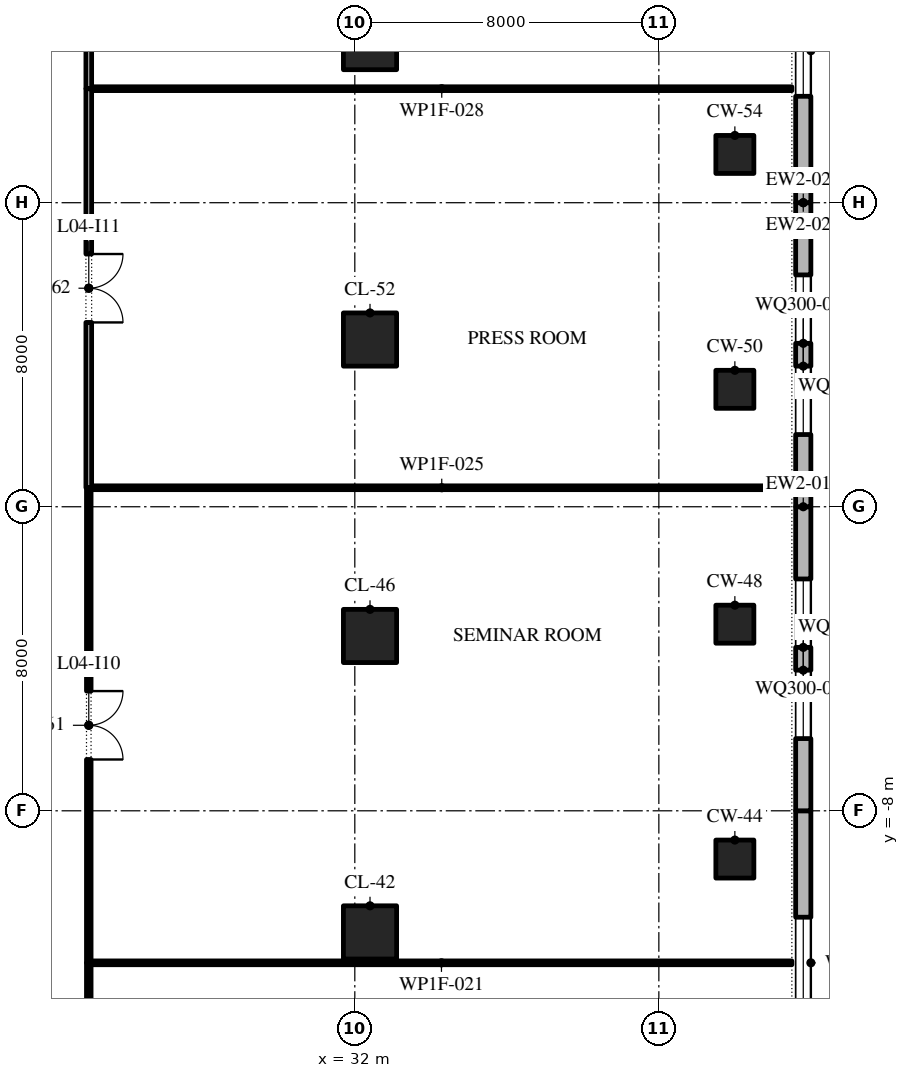
"""IFC4 building model, lengths in metres.
Left out: names, types, materials, properties, quantities, classifications, styles, units other than length and angle.
Written with IfcOpenShell. Run it as: python <this file> out.ifc"""

import sys

from ifc_helpers import new_model, si_unit, direction, frame, frame_2d, origin, origin_2d, place, context, subcontext, project, spatial, polyline, rectangle, outline, extrude, element, fill, save


model = new_model("IFC4")
c1 = context("Model", 3, precision=1e-05, world=origin(), true_north=direction((0.0, 1.0)))
c2 = subcontext(c1, "Body", "Model", "MODEL_VIEW")
j1 = project(units=[si_unit("LENGTHUNIT", "METRE"), si_unit("PLANEANGLEUNIT", "RADIAN")], contexts=[c1])
p1 = place(None, origin())
s1 = spatial("IfcSite", under=j1, at=p1, CompositionType="ELEMENT")
p2 = place(p1, origin())
s2 = spatial("IfcBuilding", under=s1, at=p2, CompositionType="ELEMENT")
p3 = place(p2, frame((0.0, 0.0, 24.0)))
s3 = spatial("IfcBuildingStorey", under=s2, at=p3, CompositionType="ELEMENT", Elevation=24.0)
p4 = place(p3, frame((32.4, -11.2, 0.0), z_axis=(0.0, 0.0, 1.0), x_axis=(1.0, 0.0, 0.0)))
e1 = element("IfcColumn", 1, at=p4, inside=s3, PredefinedType="COLUMN", context=c2, shape_type="SweptSolid", body=[
    extrude(rectangle(XDim=1.4, YDim=1.4, at=origin_2d()), origin(), (0.0, 0.0, 1.0), 4.8),
])
p5 = place(p3, frame((42.0, -9.27, 0.0), z_axis=(0.0, 0.0, 1.0), x_axis=(1.0, 0.0, 0.0)))
e2 = element("IfcColumn", 2, at=p5, inside=s3, PredefinedType="COLUMN", context=c2, shape_type="SweptSolid", body=[
    extrude(rectangle(XDim=1.0, YDim=1.0, at=origin_2d()), origin(), (0.0, 0.0, 1.0), 4.8),
])
p6 = place(p3, frame((32.4, -3.4, 0.0), z_axis=(0.0, 0.0, 1.0), x_axis=(1.0, 0.0, 0.0)))
e3 = element("IfcColumn", 3, at=p6, inside=s3, PredefinedType="COLUMN", context=c2, shape_type="SweptSolid", body=[
    extrude(rectangle(XDim=1.4, YDim=1.4, at=origin_2d()), origin(), (0.0, 0.0, 1.0), 4.8),
])
for number, where, z_axis, x_axis in (
    (4, (42.0, -3.09, 0.0), (0.0, 0.0, 1.0), (1.0, 0.0, 0.0)),
    (5, (42.0, 3.09, 0.0), (0.0, 0.0, 1.0), (1.0, 0.0, 0.0)),
):
    element("IfcColumn", number, at=place(p3, frame(where, z_axis=z_axis, x_axis=x_axis)), inside=s3, PredefinedType="COLUMN", context=c2, shape_type="SweptSolid", body=[
        extrude(rectangle(XDim=1.0, YDim=1.0, at=origin_2d()), origin(), (0.0, 0.0, 1.0), 4.8),
    ])
p7 = place(p3, frame((32.4, 4.4, 0.0), z_axis=(0.0, 0.0, 1.0), x_axis=(1.0, 0.0, 0.0)))
e6 = element("IfcColumn", 6, at=p7, inside=s3, PredefinedType="COLUMN", context=c2, shape_type="SweptSolid", body=[
    extrude(rectangle(XDim=1.4, YDim=1.4, at=origin_2d()), origin(), (0.0, 0.0, 1.0), 4.8),
])
p8 = place(p3, frame((42.0, 9.27, 0.0), z_axis=(0.0, 0.0, 1.0), x_axis=(1.0, 0.0, 0.0)))
e7 = element("IfcColumn", 7, at=p8, inside=s3, PredefinedType="COLUMN", context=c2, shape_type="SweptSolid", body=[
    extrude(rectangle(XDim=1.0, YDim=1.0, at=origin_2d()), origin(), (0.0, 0.0, 1.0), 4.8),
])
p9 = place(p3, frame((32.4, 12.2, 0.0), z_axis=(0.0, 0.0, 1.0), x_axis=(1.0, 0.0, 0.0)))
e8 = element("IfcColumn", 8, at=p9, inside=s3, PredefinedType="COLUMN", context=c2, shape_type="SweptSolid", body=[
    extrude(rectangle(XDim=1.4, YDim=1.4, at=origin_2d()), origin(), (0.0, 0.0, 1.0), 4.8),
])
p10 = place(p3, frame((43.8, -16.0, 0.0), z_axis=(0.0, 0.0, 1.0), x_axis=(0.0, 1.0, 0.0)))
e9 = element("IfcWall", 9, at=p10, inside=s3, PredefinedType="STANDARD", context=c2, shape_type="SweptSolid", body=[
    extrude(rectangle(XDim=8.0, YDim=0.4, at=frame_2d((4.0, 0.0))), origin(), (0.0, 0.0, 1.0), 4.5),
])
p11 = place(p10, frame((2.8, 0.0, 0.9)))
e10 = element("IfcOpeningElement", 10, at=p11, cuts=e9, PredefinedType="OPENING", context=c2, shape_type="SweptSolid", body=[
    extrude(outline(polyline([(0.0, 0.0), (2.4, 0.0), (2.4, 1.5), (2.378, 1.758), (2.313, 2.009), (2.207, 2.245), (2.063, 2.46), (1.885, 2.648), (1.677, 2.804), (1.447, 2.922), (1.2, 3.0), (0.953, 2.922), (0.722, 2.804), (0.515, 2.648), (0.337, 2.46), (0.193, 2.245), (0.087, 2.009), (0.022, 1.758), (0.0, 1.5), (0.0, 0.0)])), frame((0.0, 0.21, 0.0), z_axis=(0.0, -1.0, 0.0), x_axis=(1.0, 0.0, 0.0)), (0.0, 0.0, 1.0), 0.42),
])
p12 = place(p3, frame((43.8, -8.0, 0.0), z_axis=(0.0, 0.0, 1.0), x_axis=(0.0, 1.0, 0.0)))
e11 = element("IfcWall", 11, at=p12, inside=s3, PredefinedType="STANDARD", context=c2, shape_type="SweptSolid", body=[
    extrude(rectangle(XDim=8.0, YDim=0.4, at=frame_2d((4.0, 0.0))), origin(), (0.0, 0.0, 1.0), 4.5),
])
p13 = place(p12, frame((1.9, 0.0, 0.9)))
e12 = element("IfcOpeningElement", 12, at=p13, cuts=e11, PredefinedType="OPENING", context=c2, shape_type="SweptSolid", body=[
    extrude(outline(polyline([(0.0, 0.0), (1.8, 0.0), (1.8, 1.5), (1.785, 1.729), (1.738, 1.954), (1.662, 2.17), (1.558, 2.375), (1.427, 2.563), (1.271, 2.732), (1.095, 2.879), (0.9, 3.0), (0.705, 2.879), (0.529, 2.732), (0.373, 2.563), (0.242, 2.375), (0.138, 2.17), (0.062, 1.954), (0.015, 1.729), (0.0, 1.5), (0.0, 0.0)])), frame((0.0, 0.21, 0.0), z_axis=(0.0, -1.0, 0.0), x_axis=(1.0, 0.0, 0.0)), (0.0, 0.0, 1.0), 0.42),
])
p14 = place(p12, frame((4.3, 0.0, 0.9)))
e13 = element("IfcOpeningElement", 13, at=p14, cuts=e11, PredefinedType="OPENING", context=c2, shape_type="SweptSolid", body=[
    extrude(outline(polyline([(0.0, 0.0), (1.8, 0.0), (1.8, 1.5), (1.785, 1.729), (1.738, 1.954), (1.662, 2.17), (1.558, 2.375), (1.427, 2.563), (1.271, 2.732), (1.095, 2.879), (0.9, 3.0), (0.705, 2.879), (0.529, 2.732), (0.373, 2.563), (0.242, 2.375), (0.138, 2.17), (0.062, 1.954), (0.015, 1.729), (0.0, 1.5), (0.0, 0.0)])), frame((0.0, 0.21, 0.0), z_axis=(0.0, -1.0, 0.0), x_axis=(1.0, 0.0, 0.0)), (0.0, 0.0, 1.0), 0.42),
])
p15 = place(p3, frame((43.8, 0.0, 0.0), z_axis=(0.0, 0.0, 1.0), x_axis=(0.0, 1.0, 0.0)))
e14 = element("IfcWall", 14, at=p15, inside=s3, PredefinedType="STANDARD", context=c2, shape_type="SweptSolid", body=[
    extrude(rectangle(XDim=8.0, YDim=0.4, at=frame_2d((4.0, 0.0))), origin(), (0.0, 0.0, 1.0), 4.5),
])
p16 = place(p15, frame((1.9, 0.0, 0.9)))
e15 = element("IfcOpeningElement", 15, at=p16, cuts=e14, PredefinedType="OPENING", context=c2, shape_type="SweptSolid", body=[
    extrude(outline(polyline([(0.0, 0.0), (1.8, 0.0), (1.8, 1.5), (1.785, 1.729), (1.738, 1.954), (1.662, 2.17), (1.558, 2.375), (1.427, 2.563), (1.271, 2.732), (1.095, 2.879), (0.9, 3.0), (0.705, 2.879), (0.529, 2.732), (0.373, 2.563), (0.242, 2.375), (0.138, 2.17), (0.062, 1.954), (0.015, 1.729), (0.0, 1.5), (0.0, 0.0)])), frame((0.0, 0.21, 0.0), z_axis=(0.0, -1.0, 0.0), x_axis=(1.0, 0.0, 0.0)), (0.0, 0.0, 1.0), 0.42),
])
p17 = place(p15, frame((4.3, 0.0, 0.9)))
e16 = element("IfcOpeningElement", 16, at=p17, cuts=e14, PredefinedType="OPENING", context=c2, shape_type="SweptSolid", body=[
    extrude(outline(polyline([(0.0, 0.0), (1.8, 0.0), (1.8, 1.5), (1.785, 1.729), (1.738, 1.954), (1.662, 2.17), (1.558, 2.375), (1.427, 2.563), (1.271, 2.732), (1.095, 2.879), (0.9, 3.0), (0.705, 2.879), (0.529, 2.732), (0.373, 2.563), (0.242, 2.375), (0.138, 2.17), (0.062, 1.954), (0.015, 1.729), (0.0, 1.5), (0.0, 0.0)])), frame((0.0, 0.21, 0.0), z_axis=(0.0, -1.0, 0.0), x_axis=(1.0, 0.0, 0.0)), (0.0, 0.0, 1.0), 0.42),
])
p18 = place(p3, frame((43.8, 8.0, 0.0), z_axis=(0.0, 0.0, 1.0), x_axis=(0.0, 1.0, 0.0)))
e17 = element("IfcWall", 17, at=p18, inside=s3, PredefinedType="STANDARD", context=c2, shape_type="SweptSolid", body=[
    extrude(rectangle(XDim=8.0, YDim=0.4, at=frame_2d((4.0, 0.0))), origin(), (0.0, 0.0, 1.0), 4.5),
])
p19 = place(p18, frame((2.8, 0.0, 0.9)))
e18 = element("IfcOpeningElement", 18, at=p19, cuts=e17, PredefinedType="OPENING", context=c2, shape_type="SweptSolid", body=[
    extrude(outline(polyline([(0.0, 0.0), (2.4, 0.0), (2.4, 1.5), (2.378, 1.758), (2.313, 2.009), (2.207, 2.245), (2.063, 2.46), (1.885, 2.648), (1.677, 2.804), (1.447, 2.922), (1.2, 3.0), (0.953, 2.922), (0.722, 2.804), (0.515, 2.648), (0.337, 2.46), (0.193, 2.245), (0.087, 2.009), (0.022, 1.758), (0.0, 1.5), (0.0, 0.0)])), frame((0.0, 0.21, 0.0), z_axis=(0.0, -1.0, 0.0), x_axis=(1.0, 0.0, 0.0)), (0.0, 0.0, 1.0), 0.42),
])
p20 = place(p3, frame((25.06, -12.0, 0.0), z_axis=(0.0, 0.0, 1.0), x_axis=(1.0, 0.0, 0.0)))
e19 = element("IfcWall", 19, at=p20, inside=s3, PredefinedType="PARTITIONING", context=c2, shape_type="SweptSolid", body=[
    extrude(rectangle(XDim=18.44, YDim=0.1, at=frame_2d((9.22, 0.0))), origin(), (0.0, 0.0, 1.0), 4.5),
])
for number, where, z_axis, x_axis in (
    (20, (25.075, 0.5, 0.0), (0.0, 0.0, 1.0), (1.0, 0.0, 0.0)),
    (21, (25.075, 11.0, 0.0), (0.0, 0.0, 1.0), (1.0, 0.0, 0.0)),
):
    element("IfcWall", number, at=place(p3, frame(where, z_axis=z_axis, x_axis=x_axis)), inside=s3, PredefinedType="PARTITIONING", context=c2, shape_type="SweptSolid", body=[
        extrude(rectangle(XDim=18.425, YDim=0.1, at=frame_2d((9.212, 0.0))), origin(), (0.0, 0.0, 1.0), 4.5),
    ])
p21 = place(p3, frame((25.0, -22.5, 0.0), z_axis=(0.0, 0.0, 1.0), x_axis=(0.0, 1.0, 0.0)))
e22 = element("IfcWall", 22, at=p21, inside=s3, PredefinedType="PARTITIONING", context=c2, shape_type="SweptSolid", body=[
    extrude(rectangle(XDim=10.5, YDim=0.12, at=frame_2d((5.25, 0.0))), origin(), (0.0, 0.0, 1.0), 4.5),
])
p22 = place(p21, frame((4.35, 0.0, 0.0)))
e23 = element("IfcOpeningElement", 23, at=p22, cuts=e22, PredefinedType="OPENING", context=c2, shape_type="SweptSolid", body=[
    extrude(rectangle(XDim=1.8, YDim=2.1, at=frame_2d((0.9, 1.05))), frame((0.0, 0.07, 0.0), z_axis=(0.0, -1.0, 0.0), x_axis=(1.0, 0.0, 0.0)), (0.0, 0.0, 1.0), 0.14),
])
p23 = place(p3, frame((25.0, -12.0, 0.0), z_axis=(0.0, 0.0, 1.0), x_axis=(0.0, 1.0, 0.0)))
e24 = element("IfcWall", 24, at=p23, inside=s3, PredefinedType="PARTITIONING", context=c2, shape_type="SweptSolid", body=[
    extrude(rectangle(XDim=12.5, YDim=0.12, at=frame_2d((6.25, 0.0))), origin(), (0.0, 0.0, 1.0), 4.5),
])
p24 = place(p23, frame((5.35, 0.0, 0.0)))
e25 = element("IfcOpeningElement", 25, at=p24, cuts=e24, PredefinedType="OPENING", context=c2, shape_type="SweptSolid", body=[
    extrude(rectangle(XDim=1.8, YDim=2.1, at=frame_2d((0.9, 1.05))), frame((0.0, 0.07, 0.0), z_axis=(0.0, -1.0, 0.0), x_axis=(1.0, 0.0, 0.0)), (0.0, 0.0, 1.0), 0.14),
])
p25 = place(p3, frame((25.0, 0.5, 0.0), z_axis=(0.0, 0.0, 1.0), x_axis=(0.0, 1.0, 0.0)))
e26 = element("IfcWall", 26, at=p25, inside=s3, PredefinedType="PARTITIONING", context=c2, shape_type="SweptSolid", body=[
    extrude(rectangle(XDim=10.5, YDim=0.15, at=frame_2d((5.25, 0.0))), origin(), (0.0, 0.0, 1.0), 4.5),
])
p26 = place(p25, frame((4.35, 0.0, 0.0)))
e27 = element("IfcOpeningElement", 27, at=p26, cuts=e26, PredefinedType="OPENING", context=c2, shape_type="SweptSolid", body=[
    extrude(rectangle(XDim=1.8, YDim=2.1, at=frame_2d((0.9, 1.05))), frame((0.0, 0.085, 0.0), z_axis=(0.0, -1.0, 0.0), x_axis=(1.0, 0.0, 0.0)), (0.0, 0.0, 1.0), 0.17),
])
p27 = place(p3, frame((25.0, 11.0, 0.0), z_axis=(0.0, 0.0, 1.0), x_axis=(0.0, 1.0, 0.0)))
e28 = element("IfcWall", 28, at=p27, inside=s3, PredefinedType="PARTITIONING", context=c2, shape_type="SweptSolid", body=[
    extrude(rectangle(XDim=11.0, YDim=0.15, at=frame_2d((5.5, 0.0))), origin(), (0.0, 0.0, 1.0), 4.5),
])
p28 = place(p27, frame((4.6, 0.0, 0.0)))
e29 = element("IfcOpeningElement", 29, at=p28, cuts=e28, PredefinedType="OPENING", context=c2, shape_type="SweptSolid", body=[
    extrude(rectangle(XDim=1.8, YDim=2.1, at=frame_2d((0.9, 1.05))), frame((0.0, 0.085, 0.0), z_axis=(0.0, -1.0, 0.0), x_axis=(1.0, 0.0, 0.0)), (0.0, 0.0, 1.0), 0.17),
])
p29 = place(p11, origin())
e30 = element("IfcWindow", 30, at=p29, inside=s3, PartitioningType="DOUBLE_PANEL_VERTICAL", PredefinedType="WINDOW", context=c2, shape_type="SweptSolid", body=[
    extrude(outline(polyline([(0.0, 0.0), (2.4, 0.0), (2.4, 1.5), (2.378, 1.758), (2.313, 2.009), (2.207, 2.245), (2.063, 2.46), (1.885, 2.648), (1.677, 2.804), (1.447, 2.922), (1.2, 3.0), (0.953, 2.922), (0.722, 2.804), (0.515, 2.648), (0.337, 2.46), (0.193, 2.245), (0.087, 2.009), (0.022, 1.758), (0.0, 1.5), (0.0, 0.0)])), frame((0.0, 0.03, 0.0), z_axis=(0.0, -1.0, 0.0), x_axis=(1.0, 0.0, 0.0)), (0.0, 0.0, 1.0), 0.06),
])
fill(e10, e30)
p30 = place(p13, origin())
e31 = element("IfcWindow", 31, at=p30, inside=s3, PartitioningType="DOUBLE_PANEL_VERTICAL", PredefinedType="WINDOW", context=c2, shape_type="SweptSolid", body=[
    extrude(outline(polyline([(0.0, 0.0), (1.8, 0.0), (1.8, 1.5), (1.785, 1.729), (1.738, 1.954), (1.662, 2.17), (1.558, 2.375), (1.427, 2.563), (1.271, 2.732), (1.095, 2.879), (0.9, 3.0), (0.705, 2.879), (0.529, 2.732), (0.373, 2.563), (0.242, 2.375), (0.138, 2.17), (0.062, 1.954), (0.015, 1.729), (0.0, 1.5), (0.0, 0.0)])), frame((0.0, 0.03, 0.0), z_axis=(0.0, -1.0, 0.0), x_axis=(1.0, 0.0, 0.0)), (0.0, 0.0, 1.0), 0.06),
])
fill(e12, e31)
p31 = place(p14, origin())
e32 = element("IfcWindow", 32, at=p31, inside=s3, PartitioningType="DOUBLE_PANEL_VERTICAL", PredefinedType="WINDOW", context=c2, shape_type="SweptSolid", body=[
    extrude(outline(polyline([(0.0, 0.0), (1.8, 0.0), (1.8, 1.5), (1.785, 1.729), (1.738, 1.954), (1.662, 2.17), (1.558, 2.375), (1.427, 2.563), (1.271, 2.732), (1.095, 2.879), (0.9, 3.0), (0.705, 2.879), (0.529, 2.732), (0.373, 2.563), (0.242, 2.375), (0.138, 2.17), (0.062, 1.954), (0.015, 1.729), (0.0, 1.5), (0.0, 0.0)])), frame((0.0, 0.03, 0.0), z_axis=(0.0, -1.0, 0.0), x_axis=(1.0, 0.0, 0.0)), (0.0, 0.0, 1.0), 0.06),
])
fill(e13, e32)
p32 = place(p16, origin())
e33 = element("IfcWindow", 33, at=p32, inside=s3, PartitioningType="DOUBLE_PANEL_VERTICAL", PredefinedType="WINDOW", context=c2, shape_type="SweptSolid", body=[
    extrude(outline(polyline([(0.0, 0.0), (1.8, 0.0), (1.8, 1.5), (1.785, 1.729), (1.738, 1.954), (1.662, 2.17), (1.558, 2.375), (1.427, 2.563), (1.271, 2.732), (1.095, 2.879), (0.9, 3.0), (0.705, 2.879), (0.529, 2.732), (0.373, 2.563), (0.242, 2.375), (0.138, 2.17), (0.062, 1.954), (0.015, 1.729), (0.0, 1.5), (0.0, 0.0)])), frame((0.0, 0.03, 0.0), z_axis=(0.0, -1.0, 0.0), x_axis=(1.0, 0.0, 0.0)), (0.0, 0.0, 1.0), 0.06),
])
fill(e15, e33)
p33 = place(p17, origin())
e34 = element("IfcWindow", 34, at=p33, inside=s3, PartitioningType="DOUBLE_PANEL_VERTICAL", PredefinedType="WINDOW", context=c2, shape_type="SweptSolid", body=[
    extrude(outline(polyline([(0.0, 0.0), (1.8, 0.0), (1.8, 1.5), (1.785, 1.729), (1.738, 1.954), (1.662, 2.17), (1.558, 2.375), (1.427, 2.563), (1.271, 2.732), (1.095, 2.879), (0.9, 3.0), (0.705, 2.879), (0.529, 2.732), (0.373, 2.563), (0.242, 2.375), (0.138, 2.17), (0.062, 1.954), (0.015, 1.729), (0.0, 1.5), (0.0, 0.0)])), frame((0.0, 0.03, 0.0), z_axis=(0.0, -1.0, 0.0), x_axis=(1.0, 0.0, 0.0)), (0.0, 0.0, 1.0), 0.06),
])
fill(e16, e34)
p34 = place(p19, origin())
e35 = element("IfcWindow", 35, at=p34, inside=s3, PartitioningType="DOUBLE_PANEL_VERTICAL", PredefinedType="WINDOW", context=c2, shape_type="SweptSolid", body=[
    extrude(outline(polyline([(0.0, 0.0), (2.4, 0.0), (2.4, 1.5), (2.378, 1.758), (2.313, 2.009), (2.207, 2.245), (2.063, 2.46), (1.885, 2.648), (1.677, 2.804), (1.447, 2.922), (1.2, 3.0), (0.953, 2.922), (0.722, 2.804), (0.515, 2.648), (0.337, 2.46), (0.193, 2.245), (0.087, 2.009), (0.022, 1.758), (0.0, 1.5), (0.0, 0.0)])), frame((0.0, 0.03, 0.0), z_axis=(0.0, -1.0, 0.0), x_axis=(1.0, 0.0, 0.0)), (0.0, 0.0, 1.0), 0.06),
])
fill(e18, e35)
p35 = place(p24, frame((1.8, 0.0, 0.0), z_axis=(0.0, 0.0, 1.0), x_axis=(-1.0, 0.0, 0.0)))
e36 = element("IfcDoor", 36, at=p35, inside=s3, OperationType="SINGLE_SWING_LEFT", PredefinedType="DOOR", context=c2, shape_type="SweptSolid", body=[
    extrude(rectangle(XDim=1.8, YDim=2.1, at=frame_2d((0.9, 1.05))), frame((0.0, 0.025, 0.0), z_axis=(0.0, -1.0, 0.0), x_axis=(1.0, 0.0, 0.0)), (0.0, 0.0, 1.0), 0.05),
])
fill(e25, e36)
p36 = place(p26, frame((1.8, 0.0, 0.0), z_axis=(0.0, 0.0, 1.0), x_axis=(-1.0, 0.0, 0.0)))
e37 = element("IfcDoor", 37, at=p36, inside=s3, OperationType="SINGLE_SWING_LEFT", PredefinedType="DOOR", context=c2, shape_type="SweptSolid", body=[
    extrude(rectangle(XDim=1.8, YDim=2.1, at=frame_2d((0.9, 1.05))), frame((0.0, 0.025, 0.0), z_axis=(0.0, -1.0, 0.0), x_axis=(1.0, 0.0, 0.0)), (0.0, 0.0, 1.0), 0.05),
])
fill(e27, e37)
save(model, sys.argv[1])
